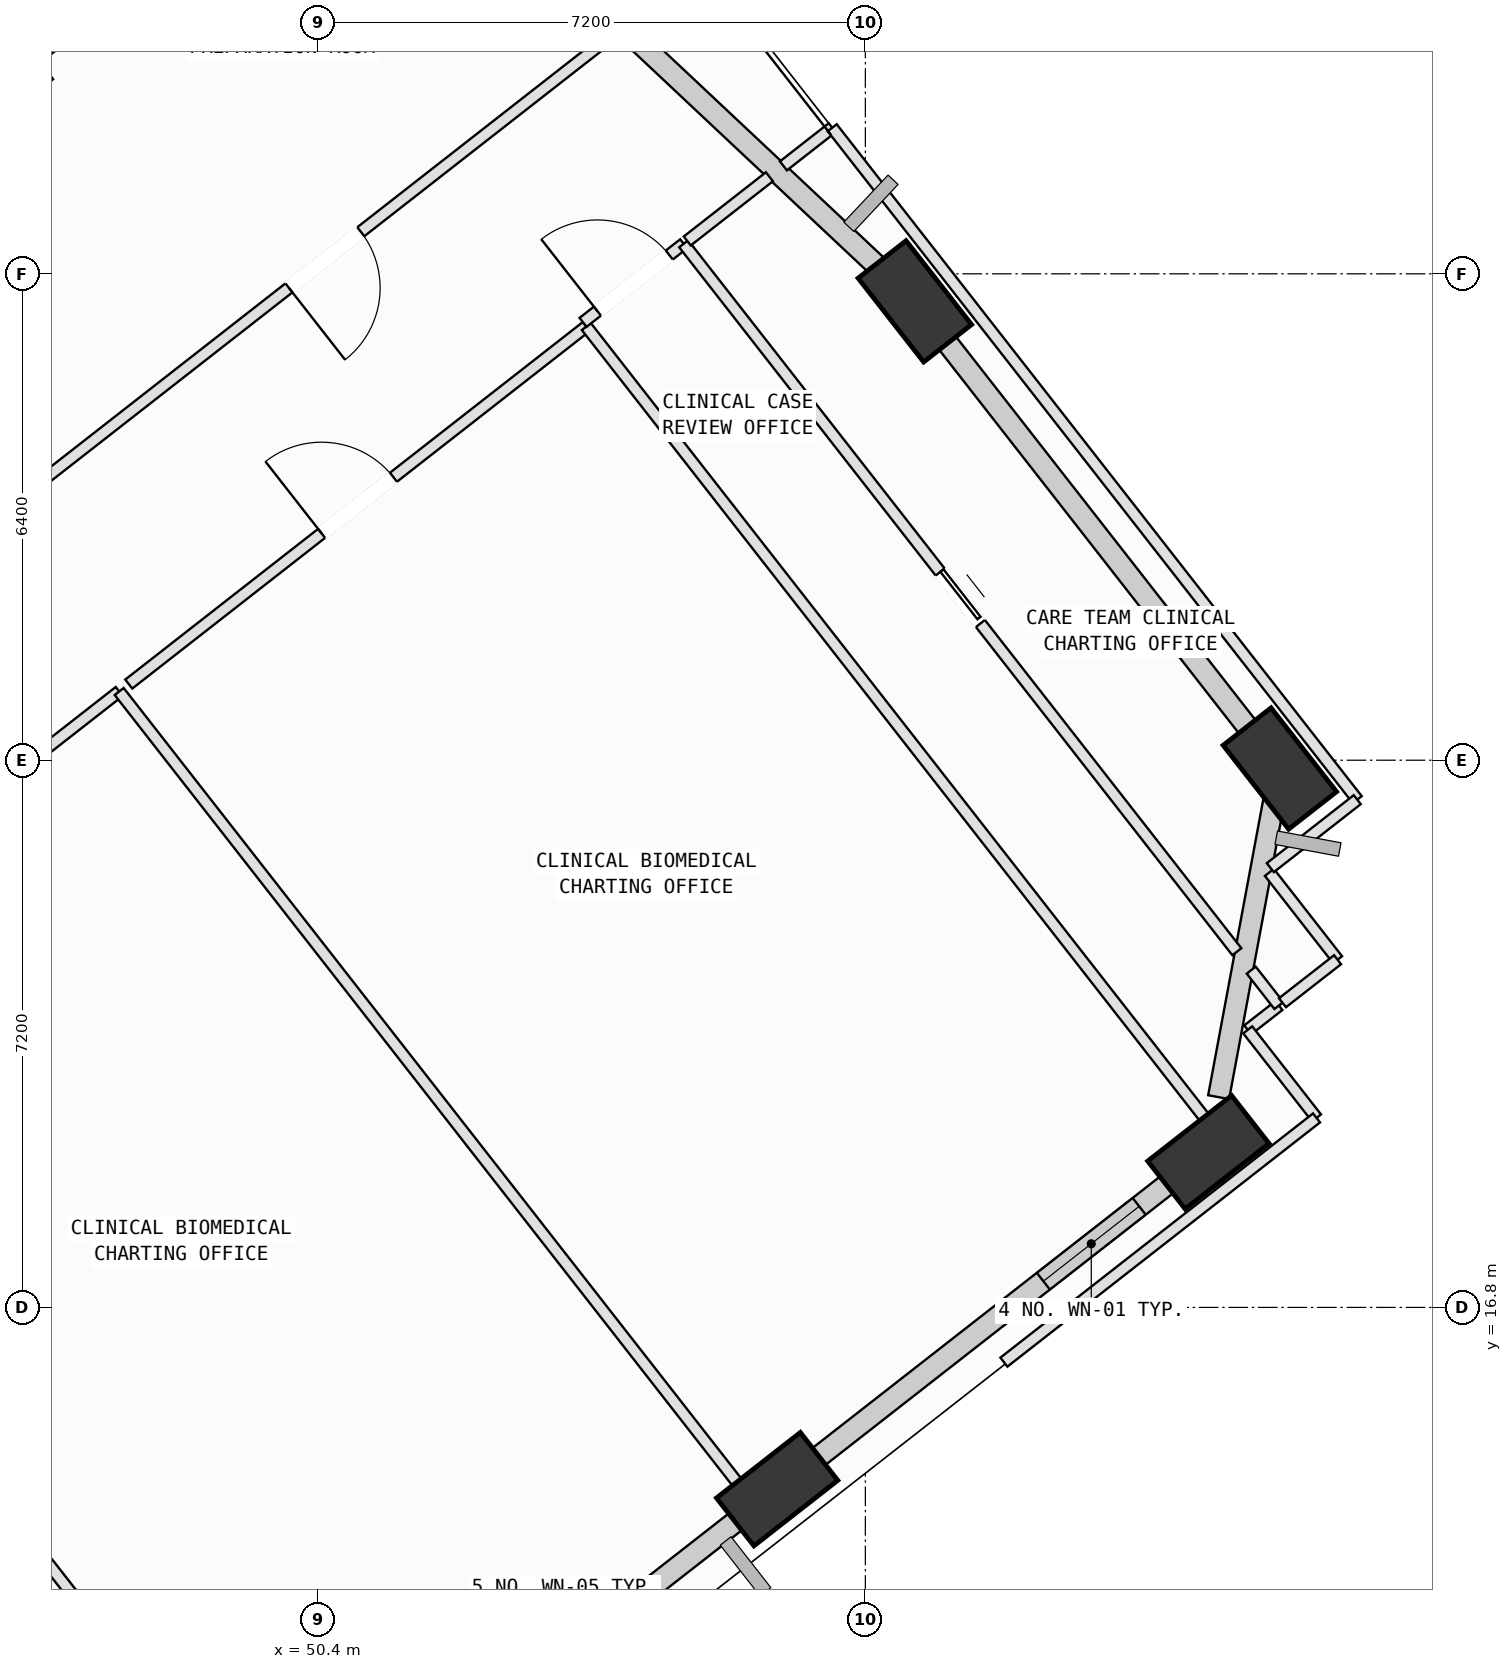
"""IFC4 building model, lengths in metres.
Left out: names, types, materials, properties, quantities, classifications, styles, units other than length and angle.
Written with IfcOpenShell. Run it as: python <this file> out.ifc"""

import sys

from ifc_helpers import new_model, si_unit, direction, frame, frame_2d, origin, origin_2d, place, context, subcontext, project, spatial, rectangle, extrude, element, fill, save


model = new_model("IFC4")
c1 = context("Model", 3, precision=1e-05, world=origin(), true_north=direction((0.0, 1.0)))
c2 = subcontext(c1, "Body", "Model", "MODEL_VIEW")
j1 = project(units=[si_unit("LENGTHUNIT", "METRE"), si_unit("PLANEANGLEUNIT", "RADIAN")], contexts=[c1])
p1 = place(None, origin())
s1 = spatial("IfcSite", under=j1, at=p1, CompositionType="ELEMENT")
p2 = place(p1, origin())
s2 = spatial("IfcBuilding", under=s1, at=p2, CompositionType="ELEMENT")
p3 = place(p2, frame((0.0, 0.0, 185.8)))
s3 = spatial("IfcBuildingStorey", under=s2, at=p3, CompositionType="ELEMENT", Elevation=185.8)
p4 = place(p3, frame((56.439, 14.409, 0.002), z_axis=(0.042048339498, 0.094487236879, 0.994637672327), x_axis=(-0.968910525672, -0.239077872553, 0.063672318137)))
e1 = element("IfcColumn", 1, at=p4, inside=s3, PredefinedType="COLUMN", context=c2, shape_type="SweptSolid", body=[
    extrude(rectangle(XDim=1.4, YDim=0.8, at=origin_2d()), origin(), (0.0, 0.0, 1.0), 4.018),
])
p5 = place(p3, frame((62.113, 18.841, 0.002), z_axis=(0.023593038341, 0.117540638318, 0.992787775351), x_axis=(-0.892887165207, -0.444190045794, 0.07380862704)))
e2 = element("IfcColumn", 2, at=p5, inside=s3, PredefinedType="COLUMN", context=c2, shape_type="SweptSolid", body=[
    extrude(rectangle(XDim=1.4, YDim=0.8, at=origin_2d()), origin(), (0.0, 0.0, 1.0), 4.025),
])
p6 = place(p3, frame((63.054, 23.891, 0.002), z_axis=(0.002728815799, 0.121220061825, 0.992621906959), x_axis=(0.597901768474, -0.795854423089, 0.095546912589)))
e3 = element("IfcColumn", 3, at=p6, inside=s3, PredefinedType="COLUMN", context=c2, shape_type="SweptSolid", body=[
    extrude(rectangle(XDim=1.4, YDim=0.8, at=origin_2d()), origin(), (0.0, 0.0, 1.0), 4.026),
])
p7 = place(p3, frame((58.251, 30.037, 0.002), z_axis=(-0.02242056414, 0.101469761824, 0.994585946884), x_axis=(0.770257272123, -0.632454034079, 0.081887908261)))
e4 = element("IfcColumn", 4, at=p7, inside=s3, PredefinedType="COLUMN", context=c2, shape_type="SweptSolid", body=[
    extrude(rectangle(XDim=1.4, YDim=0.8, at=origin_2d()), origin(), (0.0, 0.0, 1.0), 4.018),
])
p8 = place(p3, frame((56.201, 14.222, 0.0), z_axis=(0.0, 0.0, 1.0), x_axis=(-0.788018421065, -0.6156516613, 0.0)))
e5 = element("IfcWall", 5, at=p8, inside=s3, PredefinedType="SOLIDWALL", context=c2, shape_type="SweptSolid", body=[
    extrude(rectangle(XDim=6.218, YDim=0.28, at=frame_2d((3.109, 0.0))), origin(), (0.0, 0.0, 1.0), 3.265),
])
p9 = place(p8, frame((2.642, 0.0, 0.75)))
e6 = element("IfcOpeningElement", 6, at=p9, cuts=e5, PredefinedType="OPENING", context=c2, shape_type="SweptSolid", body=[
    extrude(rectangle(XDim=1.2, YDim=1.75, at=frame_2d((0.6, 0.875))), frame((0.0, 0.15, 0.0), z_axis=(0.0, -1.0, 0.0), x_axis=(1.0, 0.0, 0.0)), (0.0, 0.0, 1.0), 0.3),
])
p10 = place(p8, frame((4.495, 0.0, 0.75)))
e7 = element("IfcOpeningElement", 7, at=p10, cuts=e5, PredefinedType="OPENING", context=c2, shape_type="SweptSolid", body=[
    extrude(rectangle(XDim=1.2, YDim=1.75, at=frame_2d((0.6, 0.875))), frame((0.0, 0.15, 0.0), z_axis=(0.0, -1.0, 0.0), x_axis=(1.0, 0.0, 0.0)), (0.0, 0.0, 1.0), 0.3),
])
p11 = place(p3, frame((61.887, 18.664, 0.0), z_axis=(0.0, 0.0, 1.0), x_axis=(-0.78801310803, -0.61565846179, 0.0)))
e8 = element("IfcWall", 8, at=p11, inside=s3, PredefinedType="SOLIDWALL", context=c2, shape_type="SweptSolid", body=[
    extrude(rectangle(XDim=6.242, YDim=0.28, at=frame_2d((3.121, 0.0))), origin(), (0.0, 0.0, 1.0), 3.265),
])
p12 = place(p11, frame((0.868, 0.0, 0.75)))
e9 = element("IfcOpeningElement", 9, at=p12, cuts=e8, PredefinedType="OPENING", context=c2, shape_type="SweptSolid", body=[
    extrude(rectangle(XDim=1.6, YDim=1.95, at=frame_2d((0.8, 0.975))), frame((0.0, 0.15, 0.0), z_axis=(0.0, -1.0, 0.0), x_axis=(1.0, 0.0, 0.0)), (0.0, 0.0, 1.0), 0.3),
])
p13 = place(p3, frame((63.007, 23.642, 0.0), z_axis=(0.0, 0.0, 1.0), x_axis=(-0.183050891874, -0.983103438598, 0.0)))
e10 = element("IfcWall", 10, at=p13, inside=s3, PredefinedType="SOLIDWALL", context=c2, shape_type="SweptSolid", body=[
    extrude(rectangle(XDim=4.145, YDim=0.28, at=frame_2d((2.073, 0.0))), origin(), (0.0, 0.0, 1.0), 3.265),
])
p14 = place(p3, frame((58.436, 29.801, 0.0), z_axis=(0.0, 0.0, 1.0), x_axis=(0.615673825637, -0.78800110433, 0.0)))
e11 = element("IfcWall", 11, at=p14, inside=s3, PredefinedType="SOLIDWALL", context=c2, shape_type="SweptSolid", body=[
    extrude(rectangle(XDim=6.84, YDim=0.28, at=frame_2d((3.42, 0.0))), origin(), (0.0, 0.0, 1.0), 3.265),
])
p15 = place(p3, frame((51.333, 36.536, 0.0), z_axis=(0.0, 0.0, 1.0), x_axis=(0.728847654356, -0.684675906353, 0.0)))
e12 = element("IfcWall", 12, at=p15, inside=s3, PredefinedType="SOLIDWALL", context=c2, shape_type="SweptSolid", body=[
    extrude(rectangle(XDim=8.838, YDim=0.28, at=frame_2d((4.419, 0.0))), origin(), (0.0, 0.0, 1.0), 3.265),
])
p16 = place(p3, frame((46.481, 33.15, 0.0), z_axis=(0.0, 0.0, 1.0), x_axis=(0.788005197238, 0.615668587087, 0.0)))
e13 = element("IfcWall", 13, at=p16, inside=s3, PredefinedType="SOLIDWALL", context=c2, shape_type="SweptSolid", body=[
    extrude(rectangle(XDim=5.405, YDim=0.28, at=frame_2d((2.702, 0.0))), origin(), (0.0, 0.0, 1.0), 3.265),
])
p17 = place(p16, frame((2.098, 0.0, 0.75)))
e14 = element("IfcOpeningElement", 14, at=p17, cuts=e13, PredefinedType="OPENING", context=c2, shape_type="SweptSolid", body=[
    extrude(rectangle(XDim=1.2, YDim=1.75, at=frame_2d((0.6, 0.875))), frame((0.0, 0.15, 0.0), z_axis=(0.0, -1.0, 0.0), x_axis=(1.0, 0.0, 0.0)), (0.0, 0.0, 1.0), 0.3),
])
p18 = place(p3, frame((41.667, 20.063, 0.0), z_axis=(0.0, 0.0, 1.0), x_axis=(0.615607368114, -0.788053023802, 0.0)))
e15 = element("IfcWall", 15, at=p18, inside=s3, PredefinedType="PARTITIONING", context=c2, shape_type="SweptSolid", body=[
    extrude(rectangle(XDim=13.436, YDim=0.15, at=frame_2d((6.718, 0.0))), origin(), (0.0, 0.0, 1.0), 3.78),
])
p19 = place(p3, frame((41.762, 20.2, 0.0), z_axis=(0.0, 0.0, 1.0), x_axis=(0.78801177859, 0.615660163404, 0.0)))
e16 = element("IfcWall", 16, at=p19, inside=s3, PredefinedType="PARTITIONING", context=c2, shape_type="SweptSolid", body=[
    extrude(rectangle(XDim=7.641, YDim=0.15, at=frame_2d((3.82, 0.0))), origin(), (0.0, 0.0, 1.0), 3.065),
])
p20 = place(p19, frame((3.22, 0.0, 0.0)))
e17 = element("IfcOpeningElement", 17, at=p20, cuts=e16, PredefinedType="OPENING", context=c2, shape_type="SweptSolid", body=[
    extrude(rectangle(XDim=1.2, YDim=2.15, at=frame_2d((0.6, 1.075))), frame((0.0, 0.085, 0.0), z_axis=(0.0, -1.0, 0.0), x_axis=(1.0, 0.0, 0.0)), (0.0, 0.0, 1.0), 0.17),
])
p21 = place(p3, frame((47.783, 24.904, 0.0), z_axis=(0.0, 0.0, 1.0), x_axis=(0.615629988963, -0.788035352436, 0.0)))
e18 = element("IfcWall", 18, at=p21, inside=s3, PredefinedType="PARTITIONING", context=c2, shape_type="SweptSolid", body=[
    extrude(rectangle(XDim=13.485, YDim=0.15, at=frame_2d((6.743, 0.0))), origin(), (0.0, 0.0, 1.0), 3.78),
])
p22 = place(p3, frame((47.909, 25.002, 0.0), z_axis=(0.0, 0.0, 1.0), x_axis=(0.787963326544, 0.615722174379, 0.0)))
e19 = element("IfcWall", 19, at=p22, inside=s3, PredefinedType="PARTITIONING", context=c2, shape_type="SweptSolid", body=[
    extrude(rectangle(XDim=7.64, YDim=0.15, at=frame_2d((3.82, 0.0))), origin(), (0.0, 0.0, 1.0), 3.78),
])
p23 = place(p22, frame((3.22, 0.0, 0.0)))
e20 = element("IfcOpeningElement", 20, at=p23, cuts=e19, PredefinedType="OPENING", context=c2, shape_type="SweptSolid", body=[
    extrude(rectangle(XDim=1.2, YDim=2.15, at=frame_2d((0.6, 1.075))), frame((0.0, 0.085, 0.0), z_axis=(0.0, -1.0, 0.0), x_axis=(1.0, 0.0, 0.0)), (0.0, 0.0, 1.0), 0.17),
])
p24 = place(p3, frame((53.929, 29.706, 0.0), z_axis=(0.0, 0.0, 1.0), x_axis=(0.61569405519, -0.787985298342, 0.0)))
e21 = element("IfcWall", 21, at=p24, inside=s3, PredefinedType="PARTITIONING", context=c2, shape_type="SweptSolid", body=[
    extrude(rectangle(XDim=13.83, YDim=0.15, at=frame_2d((6.915, 0.0))), origin(), (0.0, 0.0, 1.0), 3.78),
])
p25 = place(p3, frame((62.444, 18.808, 0.0), z_axis=(0.0, 0.0, 1.0), x_axis=(-0.787856112572, -0.615859355602, 0.0)))
e22 = element("IfcWall", 22, at=p25, inside=s3, PredefinedType="PARTITIONING", context=c2, shape_type="SweptSolid", body=[
    extrude(rectangle(XDim=0.528, YDim=0.15, at=frame_2d((0.264, 0.0))), origin(), (0.0, 0.0, 1.0), 3.78),
])
p26 = place(p3, frame((57.109, 14.64, 0.0), z_axis=(0.0, 0.0, 1.0), x_axis=(-0.787960577914, -0.61572569189, 0.0)))
e23 = element("IfcWall", 23, at=p26, inside=s3, PredefinedType="PARTITIONING", context=c2, shape_type="SweptSolid", body=[
    extrude(rectangle(XDim=0.87, YDim=0.15, at=frame_2d((0.435, 0.0))), origin(), (0.0, 0.0, 1.0), 3.265),
])
p27 = place(p3, frame((54.317, 33.575, 0.0), z_axis=(0.0, 0.0, 1.0), x_axis=(-0.787990467188, -0.615687439875, 0.0)))
e24 = element("IfcWall", 24, at=p27, inside=s3, PredefinedType="PARTITIONING", context=c2, shape_type="SweptSolid", body=[
    extrude(rectangle(XDim=9.716, YDim=0.15, at=frame_2d((4.858, 0.0))), origin(), (0.0, 0.0, 1.0), 3.78),
])
p28 = place(p27, frame((4.258, 0.0, 0.0)))
e25 = element("IfcOpeningElement", 25, at=p28, cuts=e24, PredefinedType="OPENING", context=c2, shape_type="SweptSolid", body=[
    extrude(rectangle(XDim=1.2, YDim=2.15, at=frame_2d((0.6, 1.075))), frame((0.0, 0.085, 0.0), z_axis=(0.0, -1.0, 0.0), x_axis=(1.0, 0.0, 0.0)), (0.0, 0.0, 1.0), 0.17),
])
p29 = place(p3, frame((43.558, 31.565, 0.0), z_axis=(0.0, 0.0, 1.0), x_axis=(0.788013675398, 0.615657735586, 0.0)))
e26 = element("IfcWall", 26, at=p29, inside=s3, PredefinedType="PARTITIONING", context=c2, shape_type="SweptSolid", body=[
    extrude(rectangle(XDim=9.688, YDim=0.15, at=frame_2d((4.844, 0.0))), origin(), (0.0, 0.0, 1.0), 3.065),
])
p30 = place(p3, frame((63.041, 20.772, 0.0), z_axis=(0.0, 0.0, 1.0), x_axis=(-0.788188037446, -0.615434494992, 0.0)))
e27 = element("IfcWall", 27, at=p30, inside=s3, PredefinedType="PARTITIONING", context=c2, shape_type="SweptSolid", body=[
    extrude(rectangle(XDim=0.52, YDim=0.15, at=frame_2d((0.26, 0.0))), origin(), (0.0, 0.0, 1.0), 3.78),
])
p31 = place(p3, frame((62.631, 20.452, 0.0), z_axis=(0.0, 0.0, 1.0), x_axis=(0.615376556303, -0.788233273818, 0.0)))
e28 = element("IfcWall", 28, at=p31, inside=s3, PredefinedType="PARTITIONING", context=c2, shape_type="SweptSolid", body=[
    extrude(rectangle(XDim=1.47, YDim=0.15, at=frame_2d((0.735, 0.0))), origin(), (0.0, 0.0, 1.0), 3.78),
])
p32 = place(p3, frame((63.536, 19.293, 0.0), z_axis=(0.0, 0.0, 1.0), x_axis=(-0.788045649509, -0.615616807998, 0.0)))
e29 = element("IfcWall", 29, at=p32, inside=s3, PredefinedType="PARTITIONING", context=c2, shape_type="SweptSolid", body=[
    extrude(rectangle(XDim=5.219, YDim=0.15, at=frame_2d((2.609, 0.0))), origin(), (0.0, 0.0, 1.0), 3.78),
])
p33 = place(p3, frame((53.886, 29.761, 0.0), z_axis=(0.0, 0.0, 1.0), x_axis=(0.788145543456, 0.615488913247, 0.0)))
e30 = element("IfcWall", 30, at=p33, inside=s3, PredefinedType="PARTITIONING", context=c2, shape_type="SweptSolid", body=[
    extrude(rectangle(XDim=1.68, YDim=0.15, at=frame_2d((0.84, 0.0))), origin(), (0.0, 0.0, 1.0), 3.78),
])
p34 = place(p33, frame((0.24, 0.0, 0.0)))
e31 = element("IfcOpeningElement", 31, at=p34, cuts=e30, PredefinedType="OPENING", context=c2, shape_type="SweptSolid", body=[
    extrude(rectangle(XDim=1.2, YDim=2.15, at=frame_2d((0.6, 1.075))), frame((0.0, 0.085, 0.0), z_axis=(0.0, -1.0, 0.0), x_axis=(1.0, 0.0, 0.0)), (0.0, 0.0, 1.0), 0.17),
])
p35 = place(p3, frame((55.21, 30.795, 0.0), z_axis=(0.0, 0.0, 1.0), x_axis=(0.615684921199, -0.787992435122, 0.0)))
e32 = element("IfcWall", 32, at=p35, inside=s3, PredefinedType="PARTITIONING", context=c2, shape_type="SweptSolid", body=[
    extrude(rectangle(XDim=11.821, YDim=0.15, at=frame_2d((5.911, 0.0))), origin(), (0.0, 0.0, 1.0), 3.78),
])
p36 = place(p35, frame((5.481, 0.0, 0.0)))
e33 = element("IfcOpeningElement", 33, at=p36, cuts=e32, PredefinedType="OPENING", context=c2, shape_type="SweptSolid", body=[
    extrude(rectangle(XDim=0.86, YDim=2.06, at=frame_2d((0.43, 1.03))), frame((0.0, 0.085, 0.0), z_axis=(0.0, -1.0, 0.0), x_axis=(1.0, 0.0, 0.0)), (0.0, 0.0, 1.0), 0.17),
])
p37 = place(p3, frame((62.677, 21.238, 0.0), z_axis=(0.0, 0.0, 1.0), x_axis=(0.615539888524, -0.788105732523, 0.0)))
e34 = element("IfcWall", 34, at=p37, inside=s3, PredefinedType="PARTITIONING", context=c2, shape_type="SweptSolid", body=[
    extrude(rectangle(XDim=0.591, YDim=0.15, at=frame_2d((0.296, 0.0))), origin(), (0.0, 0.0, 1.0), 3.78),
])
p38 = place(p3, frame((62.916, 22.524, 0.0), z_axis=(0.0, 0.0, 1.0), x_axis=(0.615377477053, -0.788232554984, 0.0)))
e35 = element("IfcWall", 35, at=p38, inside=s3, PredefinedType="PARTITIONING", context=c2, shape_type="SweptSolid", body=[
    extrude(rectangle(XDim=1.458, YDim=0.15, at=frame_2d((0.729, 0.0))), origin(), (0.0, 0.0, 1.0), 3.78),
])
p39 = place(p3, frame((63.813, 21.375, 0.0), z_axis=(0.0, 0.0, 1.0), x_axis=(-0.788322063448, -0.615262809116, 0.0)))
e36 = element("IfcWall", 36, at=p39, inside=s3, PredefinedType="PARTITIONING", context=c2, shape_type="SweptSolid", body=[
    extrude(rectangle(XDim=0.92, YDim=0.15, at=frame_2d((0.46, 0.0))), origin(), (0.0, 0.0, 1.0), 3.78),
])
p40 = place(p3, frame((55.257, 30.832, 0.0), z_axis=(0.0, 0.0, 1.0), x_axis=(0.787816586206, 0.615909917519, 0.0)))
e37 = element("IfcWall", 37, at=p40, inside=s3, PredefinedType="PARTITIONING", context=c2, shape_type="SweptSolid", body=[
    extrude(rectangle(XDim=1.372, YDim=0.15, at=frame_2d((0.686, 0.0))), origin(), (0.0, 0.0, 1.0), 3.78),
])
p41 = place(p3, frame((56.522, 31.82, 0.0), z_axis=(0.0, 0.0, 1.0), x_axis=(0.787833593438, 0.615888162779, 0.0)))
e38 = element("IfcWall", 38, at=p41, inside=s3, PredefinedType="PARTITIONING", context=c2, shape_type="SweptSolid", body=[
    extrude(rectangle(XDim=0.815, YDim=0.15, at=frame_2d((0.407, 0.0))), origin(), (0.0, 0.0, 1.0), 3.78),
])
p42 = place(p3, frame((57.164, 32.322, 0.0), z_axis=(0.0, 0.0, 1.0), x_axis=(0.615692601108, -0.787986434491, 0.0)))
e39 = element("IfcWall", 39, at=p42, inside=s3, PredefinedType="PARTITIONING", context=c2, shape_type="SweptSolid", body=[
    extrude(rectangle(XDim=11.22, YDim=0.15, at=frame_2d((5.61, 0.0))), origin(), (0.0, 0.0, 1.0), 3.265),
])
p43 = place(p3, frame((64.072, 23.481, 0.0), z_axis=(0.0, 0.0, 1.0), x_axis=(-0.787611392409, -0.616172292909, 0.0)))
e40 = element("IfcWall", 40, at=p43, inside=s3, PredefinedType="PARTITIONING", context=c2, shape_type="SweptSolid", body=[
    extrude(rectangle(XDim=1.453, YDim=0.15, at=frame_2d((0.726, 0.0))), origin(), (0.0, 0.0, 1.0), 3.78),
])
p44 = place(p12, origin())
e41 = element("IfcWindow", 41, at=p44, inside=s3, PartitioningType="SINGLE_PANEL", PredefinedType="WINDOW", context=c2, shape_type="SweptSolid", body=[
    extrude(rectangle(XDim=1.6, YDim=1.95, at=frame_2d((0.8, 0.975))), frame((0.0, 0.03, 0.0), z_axis=(0.0, -1.0, 0.0), x_axis=(1.0, 0.0, 0.0)), (0.0, 0.0, 1.0), 0.06),
])
fill(e9, e41)
p45 = place(p23, origin())
e42 = element("IfcDoor", 42, at=p45, inside=s3, OperationType="SINGLE_SWING_LEFT", PredefinedType="DOOR", context=c2, shape_type="SweptSolid", body=[
    extrude(rectangle(XDim=1.2, YDim=2.15, at=frame_2d((0.6, 1.075))), frame((0.0, 0.025, 0.0), z_axis=(0.0, -1.0, 0.0), x_axis=(1.0, 0.0, 0.0)), (0.0, 0.0, 1.0), 0.05),
])
fill(e20, e42)
p46 = place(p28, origin())
e43 = element("IfcDoor", 43, at=p46, inside=s3, OperationType="SINGLE_SWING_RIGHT", PredefinedType="DOOR", context=c2, shape_type="SweptSolid", body=[
    extrude(rectangle(XDim=1.2, YDim=2.15, at=frame_2d((0.6, 1.075))), frame((0.0, 0.025, 0.0), z_axis=(0.0, -1.0, 0.0), x_axis=(1.0, 0.0, 0.0)), (0.0, 0.0, 1.0), 0.05),
])
fill(e25, e43)
p47 = place(p34, origin())
e44 = element("IfcDoor", 44, at=p47, inside=s3, OperationType="SINGLE_SWING_LEFT", PredefinedType="DOOR", context=c2, shape_type="SweptSolid", body=[
    extrude(rectangle(XDim=1.2, YDim=2.15, at=frame_2d((0.6, 1.075))), frame((0.0, 0.025, 0.0), z_axis=(0.0, -1.0, 0.0), x_axis=(1.0, 0.0, 0.0)), (0.0, 0.0, 1.0), 0.05),
])
fill(e31, e44)
p48 = place(p36, origin())
e45 = element("IfcDoor", 45, at=p48, inside=s3, OperationType="SLIDING_TO_LEFT", PredefinedType="DOOR", context=c2, shape_type="SweptSolid", body=[
    extrude(rectangle(XDim=0.86, YDim=2.06, at=frame_2d((0.43, 1.03))), frame((0.0, 0.025, 0.0), z_axis=(0.0, -1.0, 0.0), x_axis=(1.0, 0.0, 0.0)), (0.0, 0.0, 1.0), 0.05),
])
fill(e33, e45)
save(model, sys.argv[1])
